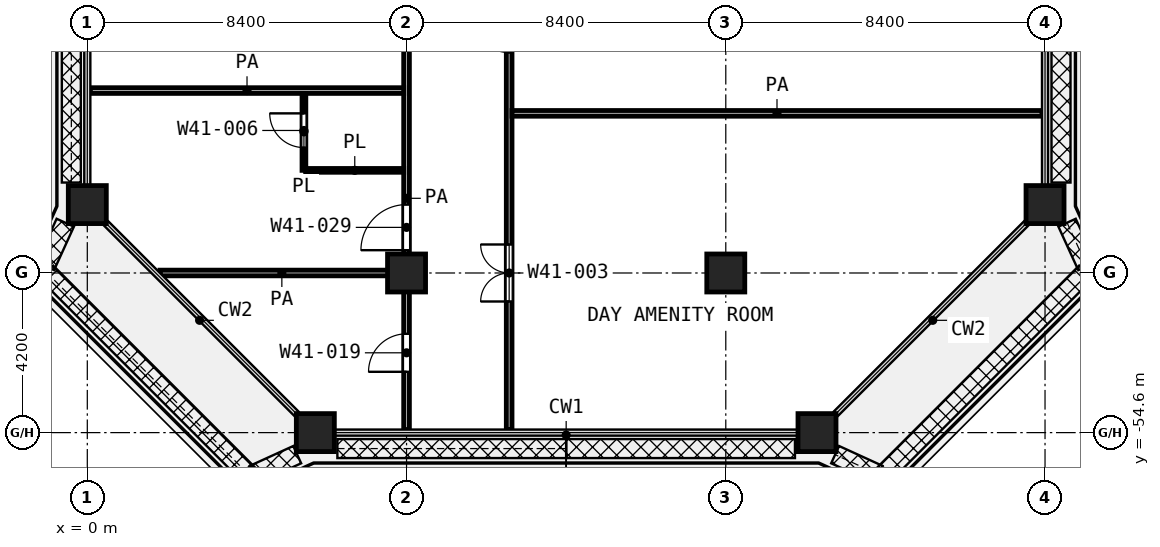
"""IFC4 building model, lengths in metres.
Left out: names, types, materials, properties, quantities, classifications, styles, units other than length and angle.
Written with IfcOpenShell. Run it as: python <this file> out.ifc"""

import sys

from ifc_helpers import new_model, si_unit, direction, frame, frame_2d, origin, origin_2d, place, context, subcontext, project, spatial, rectangle, extrude, element, fill, save


model = new_model("IFC4")
c1 = context("Model", 3, precision=1e-05, world=origin(), true_north=direction((0.0, 1.0)))
c2 = subcontext(c1, "Body", "Model", "MODEL_VIEW")
j1 = project(units=[si_unit("LENGTHUNIT", "METRE"), si_unit("PLANEANGLEUNIT", "RADIAN")], contexts=[c1])
p1 = place(None, origin())
s1 = spatial("IfcSite", under=j1, at=p1, CompositionType="ELEMENT")
p2 = place(p1, origin())
s2 = spatial("IfcBuilding", under=s1, at=p2, CompositionType="ELEMENT")
p3 = place(p2, frame((0.0, 0.0, 200.4)))
s3 = spatial("IfcBuildingStorey", under=s2, at=p3, CompositionType="ELEMENT", Elevation=200.4)
for number, where, z_axis, x_axis in (
    (1, (0.0, -48.6, 0.0), (0.0, 0.0, 1.0), (1.0, 0.0, 0.0)),
    (2, (25.2, -48.6, 0.0), (0.0, 0.0, 1.0), (1.0, 0.0, 0.0)),
    (3, (8.4, -50.4, 0.0), (0.0, 0.0, 1.0), (1.0, 0.0, 0.0)),
    (4, (16.8, -50.4, 0.0), (0.0, 0.0, 1.0), (1.0, 0.0, 0.0)),
    (5, (6.0, -54.6, 0.0), (0.0, 0.0, 1.0), (1.0, 0.0, 0.0)),
    (6, (19.2, -54.6, 0.0), (0.0, 0.0, 1.0), (1.0, 0.0, 0.0)),
):
    element("IfcColumn", number, at=place(p3, frame(where, z_axis=z_axis, x_axis=x_axis)), inside=s3, PredefinedType="COLUMN", context=c2, shape_type="SweptSolid", body=[
        extrude(rectangle(XDim=1.0, YDim=1.0, at=origin_2d()), origin(), (0.0, 0.0, 1.0), 4.2),
    ])
p4 = place(p3, frame((5.75, -47.7, 0.0), z_axis=(0.0, 0.0, 1.0), x_axis=(1.0, 0.0, 0.0)))
e7 = element("IfcWall", 7, at=p4, inside=s3, PredefinedType="PARTITIONING", context=c2, shape_type="SweptSolid", body=[
    extrude(rectangle(XDim=2.575, YDim=0.1, at=frame_2d((1.288, 0.0))), origin(), (0.0, 0.0, 1.0), 3.6),
])
p5 = place(p3, frame((5.7, -47.7, 0.0), z_axis=(0.0, 0.0, 1.0), x_axis=(0.0, 1.0, 0.0)))
e8 = element("IfcWall", 8, at=p5, inside=s3, PredefinedType="PARTITIONING", context=c2, shape_type="SweptSolid", body=[
    extrude(rectangle(XDim=2.025, YDim=0.1, at=frame_2d((1.012, 0.0))), origin(), (0.0, 0.0, 1.0), 3.6),
])
p6 = place(p5, frame((0.6, 0.0, 0.0)))
e9 = element("IfcOpeningElement", 9, at=p6, cuts=e8, PredefinedType="OPENING", context=c2, shape_type="SweptSolid", body=[
    extrude(rectangle(XDim=0.9, YDim=2.1, at=frame_2d((0.45, 1.05))), frame((0.0, 0.06, 0.0), z_axis=(0.0, -1.0, 0.0), x_axis=(1.0, 0.0, 0.0)), (0.0, 0.0, 1.0), 0.12),
])
p7 = place(p3, frame((1.913, -50.4, 0.0), z_axis=(0.0, 0.0, 1.0), x_axis=(1.0, 0.0, 0.0)))
e10 = element("IfcWall", 10, at=p7, inside=s3, PredefinedType="PARTITIONING", context=c2, shape_type="SweptSolid", body=[
    extrude(rectangle(XDim=6.412, YDim=0.15, at=frame_2d((3.206, 0.0))), origin(), (0.0, 0.0, 1.0), 3.6),
])
p8 = place(p3, frame((11.175, -46.2, 0.0), z_axis=(0.0, 0.0, 1.0), x_axis=(1.0, 0.0, 0.0)))
e11 = element("IfcWall", 11, at=p8, inside=s3, PredefinedType="PARTITIONING", context=c2, shape_type="SweptSolid", body=[
    extrude(rectangle(XDim=13.945, YDim=0.15, at=frame_2d((6.973, 0.0))), origin(), (0.0, 0.0, 1.0), 3.6),
])
p9 = place(p3, frame((0.08, -45.6, 0.0), z_axis=(0.0, 0.0, 1.0), x_axis=(1.0, 0.0, 0.0)))
e12 = element("IfcWall", 12, at=p9, inside=s3, PredefinedType="PARTITIONING", context=c2, shape_type="SweptSolid", body=[
    extrude(rectangle(XDim=8.245, YDim=0.15, at=frame_2d((4.123, 0.0))), origin(), (0.0, 0.0, 1.0), 3.6),
])
p10 = place(p3, frame((8.4, -54.52, 0.0), z_axis=(0.0, 0.0, 1.0), x_axis=(0.0, 1.0, 0.0)))
e13 = element("IfcWall", 13, at=p10, inside=s3, PredefinedType="PARTITIONING", context=c2, shape_type="SweptSolid", body=[
    extrude(rectangle(XDim=12.17, YDim=0.15, at=frame_2d((6.085, 0.0))), origin(), (0.0, 0.0, 1.0), 3.6),
])
p11 = place(p10, frame((4.72, 0.0, 0.0)))
e14 = element("IfcOpeningElement", 14, at=p11, cuts=e13, PredefinedType="OPENING", context=c2, shape_type="SweptSolid", body=[
    extrude(rectangle(XDim=1.2, YDim=2.1, at=frame_2d((0.6, 1.05))), frame((0.0, 0.085, 0.0), z_axis=(0.0, -1.0, 0.0), x_axis=(1.0, 0.0, 0.0)), (0.0, 0.0, 1.0), 0.17),
])
p12 = place(p10, frame((1.52, 0.0, 0.0)))
e15 = element("IfcOpeningElement", 15, at=p12, cuts=e13, PredefinedType="OPENING", context=c2, shape_type="SweptSolid", body=[
    extrude(rectangle(XDim=1.0, YDim=2.1, at=frame_2d((0.5, 1.05))), frame((0.0, 0.085, 0.0), z_axis=(0.0, -1.0, 0.0), x_axis=(1.0, 0.0, 0.0)), (0.0, 0.0, 1.0), 0.17),
])
p13 = place(p3, frame((11.1, -54.52, 0.0), z_axis=(0.0, 0.0, 1.0), x_axis=(0.0, 1.0, 0.0)))
e16 = element("IfcWall", 16, at=p13, inside=s3, PredefinedType="PARTITIONING", context=c2, shape_type="SweptSolid", body=[
    extrude(rectangle(XDim=25.12, YDim=0.15, at=frame_2d((12.56, 0.0))), origin(), (0.0, 0.0, 1.0), 3.6),
])
p14 = place(p13, frame((22.42, 0.0, 0.0)))
e17 = element("IfcOpeningElement", 17, at=p14, cuts=e16, PredefinedType="OPENING", context=c2, shape_type="SweptSolid", body=[
    extrude(rectangle(XDim=1.2, YDim=2.1, at=frame_2d((0.6, 1.05))), frame((0.0, 0.085, 0.0), z_axis=(0.0, -1.0, 0.0), x_axis=(1.0, 0.0, 0.0)), (0.0, 0.0, 1.0), 0.17),
])
p15 = place(p13, frame((18.62, 0.0, 0.0)))
e18 = element("IfcOpeningElement", 18, at=p15, cuts=e16, PredefinedType="OPENING", context=c2, shape_type="SweptSolid", body=[
    extrude(rectangle(XDim=1.0, YDim=2.1, at=frame_2d((0.5, 1.05))), frame((0.0, 0.085, 0.0), z_axis=(0.0, -1.0, 0.0), x_axis=(1.0, 0.0, 0.0)), (0.0, 0.0, 1.0), 0.17),
])
p16 = place(p13, frame((14.42, 0.0, 0.0)))
e19 = element("IfcOpeningElement", 19, at=p16, cuts=e16, PredefinedType="OPENING", context=c2, shape_type="SweptSolid", body=[
    extrude(rectangle(XDim=1.0, YDim=2.1, at=frame_2d((0.5, 1.05))), frame((0.0, 0.085, 0.0), z_axis=(0.0, -1.0, 0.0), x_axis=(1.0, 0.0, 0.0)), (0.0, 0.0, 1.0), 0.17),
])
p17 = place(p13, frame((9.92, 0.0, 0.0)))
e20 = element("IfcOpeningElement", 20, at=p17, cuts=e16, PredefinedType="OPENING", context=c2, shape_type="SweptSolid", body=[
    extrude(rectangle(XDim=1.0, YDim=2.1, at=frame_2d((0.5, 1.05))), frame((0.0, 0.085, 0.0), z_axis=(0.0, -1.0, 0.0), x_axis=(1.0, 0.0, 0.0)), (0.0, 0.0, 1.0), 0.17),
])
p18 = place(p13, frame((3.37, 0.0, 0.0)))
e21 = element("IfcOpeningElement", 21, at=p18, cuts=e16, PredefinedType="OPENING", context=c2, shape_type="SweptSolid", body=[
    extrude(rectangle(XDim=1.5, YDim=2.1, at=frame_2d((0.75, 1.05))), frame((0.0, 0.085, 0.0), z_axis=(0.0, -1.0, 0.0), x_axis=(1.0, 0.0, 0.0)), (0.0, 0.0, 1.0), 0.17),
])
p19 = place(p11, origin())
e22 = element("IfcDoor", 22, at=p19, inside=s3, OperationType="SINGLE_SWING_LEFT", PredefinedType="DOOR", context=c2, shape_type="SweptSolid", body=[
    extrude(rectangle(XDim=1.2, YDim=2.1, at=frame_2d((0.6, 1.05))), frame((0.0, 0.025, 0.0), z_axis=(0.0, -1.0, 0.0), x_axis=(1.0, 0.0, 0.0)), (0.0, 0.0, 1.0), 0.05),
])
fill(e14, e22)
p20 = place(p6, origin())
e23 = element("IfcDoor", 23, at=p20, inside=s3, OperationType="SINGLE_SWING_RIGHT", PredefinedType="DOOR", context=c2, shape_type="SweptSolid", body=[
    extrude(rectangle(XDim=0.9, YDim=2.1, at=frame_2d((0.45, 1.05))), frame((0.0, 0.025, 0.0), z_axis=(0.0, -1.0, 0.0), x_axis=(1.0, 0.0, 0.0)), (0.0, 0.0, 1.0), 0.05),
])
fill(e9, e23)
p21 = place(p12, origin())
e24 = element("IfcDoor", 24, at=p21, inside=s3, OperationType="SINGLE_SWING_LEFT", PredefinedType="DOOR", context=c2, shape_type="SweptSolid", body=[
    extrude(rectangle(XDim=1.0, YDim=2.1, at=frame_2d((0.5, 1.05))), frame((0.0, 0.025, 0.0), z_axis=(0.0, -1.0, 0.0), x_axis=(1.0, 0.0, 0.0)), (0.0, 0.0, 1.0), 0.05),
])
fill(e15, e24)
p22 = place(p18, origin())
e25 = element("IfcDoor", 25, at=p22, inside=s3, OperationType="DOUBLE_DOOR_SINGLE_SWING", PredefinedType="DOOR", context=c2, shape_type="SweptSolid", body=[
    extrude(rectangle(XDim=1.5, YDim=2.1, at=frame_2d((0.75, 1.05))), frame((0.0, 0.025, 0.0), z_axis=(0.0, -1.0, 0.0), x_axis=(1.0, 0.0, 0.0)), (0.0, 0.0, 1.0), 0.05),
])
fill(e21, e25)
save(model, sys.argv[1])
